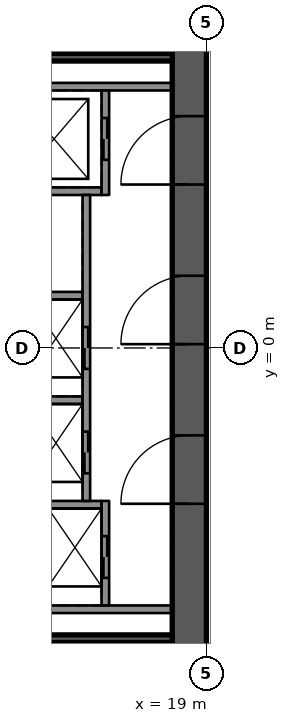
"""IFC4 building model, lengths in metres.
Left out: names, types, materials, properties, quantities, classifications, styles, units other than length and angle.
Written with IfcOpenShell. Run it as: python <this file> out.ifc"""

import sys

from ifc_helpers import new_model, si_unit, direction, frame, frame_2d, origin, place, context, subcontext, project, spatial, rectangle, extrude, element, fill, save


model = new_model("IFC4")
c1 = context("Model", 3, precision=1e-05, world=origin(), true_north=direction((0.0, 1.0)))
c2 = subcontext(c1, "Body", "Model", "MODEL_VIEW")
j1 = project(units=[si_unit("LENGTHUNIT", "METRE"), si_unit("PLANEANGLEUNIT", "RADIAN")], contexts=[c1])
p1 = place(None, origin())
s1 = spatial("IfcSite", under=j1, at=p1, CompositionType="ELEMENT")
p2 = place(p1, origin())
s2 = spatial("IfcBuilding", under=s1, at=p2, CompositionType="ELEMENT")
p3 = place(p2, frame((0.0, 0.0, 76.3)))
s3 = spatial("IfcBuildingStorey", under=s2, at=p3, CompositionType="ELEMENT", Elevation=76.3)
p4 = place(p3, frame((18.55, -12.0, 0.0), z_axis=(0.0, 0.0, 1.0), x_axis=(0.0, 1.0, 0.0)))
e1 = element("IfcWall", 1, at=p4, inside=s3, PredefinedType="SHEAR", context=c2, shape_type="SweptSolid", body=[
    extrude(rectangle(XDim=24.0, YDim=0.9, at=frame_2d((12.0, 0.0))), origin(), (0.0, 0.0, 1.0), 4.4),
])
p5 = place(p4, frame((16.3, 0.0, 0.0)))
e2 = element("IfcOpeningElement", 2, at=p5, cuts=e1, PredefinedType="OPENING", context=c2, shape_type="SweptSolid", body=[
    extrude(rectangle(XDim=1.8, YDim=2.1, at=frame_2d((0.9, 1.05))), frame((0.0, 0.46, 0.0), z_axis=(0.0, -1.0, 0.0), x_axis=(1.0, 0.0, 0.0)), (0.0, 0.0, 1.0), 0.92),
])
p6 = place(p4, frame((12.1, 0.0, 0.0)))
e3 = element("IfcOpeningElement", 3, at=p6, cuts=e1, PredefinedType="OPENING", context=c2, shape_type="SweptSolid", body=[
    extrude(rectangle(XDim=1.8, YDim=2.1, at=frame_2d((0.9, 1.05))), frame((0.0, 0.46, 0.0), z_axis=(0.0, -1.0, 0.0), x_axis=(1.0, 0.0, 0.0)), (0.0, 0.0, 1.0), 0.92),
])
p7 = place(p4, frame((7.9, 0.0, 0.0)))
e4 = element("IfcOpeningElement", 4, at=p7, cuts=e1, PredefinedType="OPENING", context=c2, shape_type="SweptSolid", body=[
    extrude(rectangle(XDim=1.8, YDim=2.1, at=frame_2d((0.9, 1.05))), frame((0.0, 0.46, 0.0), z_axis=(0.0, -1.0, 0.0), x_axis=(1.0, 0.0, 0.0)), (0.0, 0.0, 1.0), 0.92),
])
for number, where, z_axis, x_axis in (
    (5, (11.54, -6.875, 0.0), (0.0, 0.0, 1.0), (1.0, 0.0, 0.0)),
    (6, (11.54, 6.875, 0.0), (0.0, 0.0, 1.0), (1.0, 0.0, 0.0)),
):
    element("IfcWall", number, at=place(p3, frame(where, z_axis=z_axis, x_axis=x_axis)), inside=s3, PredefinedType="SOLIDWALL", context=c2, shape_type="SweptSolid", body=[
        extrude(rectangle(XDim=6.56, YDim=0.2, at=frame_2d((3.28, 0.0))), origin(), (0.0, 0.0, 1.0), 3.99),
    ])
p8 = place(p3, frame((11.54, 4.125, 0.0), z_axis=(0.0, 0.0, 1.0), x_axis=(1.0, 0.0, 0.0)))
e7 = element("IfcWall", 7, at=p8, inside=s3, PredefinedType="SOLIDWALL", context=c2, shape_type="SweptSolid", body=[
    extrude(rectangle(XDim=4.7, YDim=0.2, at=frame_2d((2.35, 0.0))), origin(), (0.0, 0.0, 1.0), 3.99),
])
for number, where, z_axis, x_axis in (
    (8, (11.54, 1.375, 0.0), (0.0, 0.0, 1.0), (1.0, 0.0, 0.0)),
    (9, (11.54, -1.375, 0.0), (0.0, 0.0, 1.0), (1.0, 0.0, 0.0)),
):
    element("IfcWall", number, at=place(p3, frame(where, z_axis=z_axis, x_axis=x_axis)), inside=s3, PredefinedType="SOLIDWALL", context=c2, shape_type="SweptSolid", body=[
        extrude(rectangle(XDim=4.2, YDim=0.2, at=frame_2d((2.1, 0.0))), origin(), (0.0, 0.0, 1.0), 3.99),
    ])
p9 = place(p3, frame((11.54, -4.125, 0.0), z_axis=(0.0, 0.0, 1.0), x_axis=(1.0, 0.0, 0.0)))
e10 = element("IfcWall", 10, at=p9, inside=s3, PredefinedType="SOLIDWALL", context=c2, shape_type="SweptSolid", body=[
    extrude(rectangle(XDim=4.7, YDim=0.2, at=frame_2d((2.35, 0.0))), origin(), (0.0, 0.0, 1.0), 3.99),
])
p10 = place(p3, frame((16.34, 6.775, 0.0), z_axis=(0.0, 0.0, 1.0), x_axis=(0.0, -1.0, 0.0)))
e11 = element("IfcWall", 11, at=p10, inside=s3, PredefinedType="SOLIDWALL", context=c2, shape_type="SweptSolid", body=[
    extrude(rectangle(XDim=2.75, YDim=0.2, at=frame_2d((1.375, 0.0))), origin(), (0.0, 0.0, 1.0), 3.99),
])
p11 = place(p10, frame((0.725, 0.0, 0.0)))
e12 = element("IfcOpeningElement", 12, at=p11, cuts=e11, PredefinedType="OPENING", context=c2, shape_type="SweptSolid", body=[
    extrude(rectangle(XDim=1.1, YDim=2.1, at=frame_2d((0.55, 1.05))), frame((0.0, 0.11, 0.0), z_axis=(0.0, -1.0, 0.0), x_axis=(1.0, 0.0, 0.0)), (0.0, 0.0, 1.0), 0.22),
])
p12 = place(p3, frame((15.84, 4.025, 0.0), z_axis=(0.0, 0.0, 1.0), x_axis=(0.0, -1.0, 0.0)))
e13 = element("IfcWall", 13, at=p12, inside=s3, PredefinedType="SOLIDWALL", context=c2, shape_type="SweptSolid", body=[
    extrude(rectangle(XDim=8.05, YDim=0.2, at=frame_2d((4.025, 0.0))), origin(), (0.0, 0.0, 1.0), 3.99),
])
p13 = place(p12, frame((3.475, 0.0, 0.0)))
e14 = element("IfcOpeningElement", 14, at=p13, cuts=e13, PredefinedType="OPENING", context=c2, shape_type="SweptSolid", body=[
    extrude(rectangle(XDim=1.1, YDim=2.1, at=frame_2d((0.55, 1.05))), frame((0.0, 0.11, 0.0), z_axis=(0.0, -1.0, 0.0), x_axis=(1.0, 0.0, 0.0)), (0.0, 0.0, 1.0), 0.22),
])
p14 = place(p12, frame((6.225, 0.0, 0.0)))
e15 = element("IfcOpeningElement", 15, at=p14, cuts=e13, PredefinedType="OPENING", context=c2, shape_type="SweptSolid", body=[
    extrude(rectangle(XDim=1.1, YDim=2.1, at=frame_2d((0.55, 1.05))), frame((0.0, 0.11, 0.0), z_axis=(0.0, -1.0, 0.0), x_axis=(1.0, 0.0, 0.0)), (0.0, 0.0, 1.0), 0.22),
])
p15 = place(p3, frame((16.34, -4.025, 0.0), z_axis=(0.0, 0.0, 1.0), x_axis=(0.0, -1.0, 0.0)))
e16 = element("IfcWall", 16, at=p15, inside=s3, PredefinedType="SOLIDWALL", context=c2, shape_type="SweptSolid", body=[
    extrude(rectangle(XDim=2.75, YDim=0.2, at=frame_2d((1.375, 0.0))), origin(), (0.0, 0.0, 1.0), 3.99),
])
p16 = place(p15, frame((0.925, 0.0, 0.0)))
e17 = element("IfcOpeningElement", 17, at=p16, cuts=e16, PredefinedType="OPENING", context=c2, shape_type="SweptSolid", body=[
    extrude(rectangle(XDim=1.1, YDim=2.1, at=frame_2d((0.55, 1.05))), frame((0.0, 0.11, 0.0), z_axis=(0.0, -1.0, 0.0), x_axis=(1.0, 0.0, 0.0)), (0.0, 0.0, 1.0), 0.22),
])
for number, where, z_axis, x_axis in (
    (18, (11.54, -7.65, 0.0), (0.0, 0.0, 1.0), (1.0, 0.0, 0.0)),
    (19, (11.54, 7.65, 0.0), (0.0, 0.0, 1.0), (1.0, 0.0, 0.0)),
):
    element("IfcWall", number, at=place(p3, frame(where, z_axis=z_axis, x_axis=x_axis)), inside=s3, PredefinedType="SOLIDWALL", context=c2, shape_type="SweptSolid", body=[
        extrude(rectangle(XDim=6.56, YDim=0.2, at=frame_2d((3.28, 0.0))), origin(), (0.0, 0.0, 1.0), 3.99),
    ])
p17 = place(p11, origin())
e20 = element("IfcDoor", 20, at=p17, inside=s3, OperationType="DOUBLE_DOOR_SLIDING", PredefinedType="DOOR", context=c2, shape_type="SweptSolid", body=[
    extrude(rectangle(XDim=1.1, YDim=2.1, at=frame_2d((0.55, 1.05))), frame((0.0, 0.025, 0.0), z_axis=(0.0, -1.0, 0.0), x_axis=(1.0, 0.0, 0.0)), (0.0, 0.0, 1.0), 0.05),
])
fill(e12, e20)
p18 = place(p13, origin())
e21 = element("IfcDoor", 21, at=p18, inside=s3, OperationType="DOUBLE_DOOR_SLIDING", PredefinedType="DOOR", context=c2, shape_type="SweptSolid", body=[
    extrude(rectangle(XDim=1.1, YDim=2.1, at=frame_2d((0.55, 1.05))), frame((0.0, 0.025, 0.0), z_axis=(0.0, -1.0, 0.0), x_axis=(1.0, 0.0, 0.0)), (0.0, 0.0, 1.0), 0.05),
])
fill(e14, e21)
p19 = place(p14, origin())
e22 = element("IfcDoor", 22, at=p19, inside=s3, OperationType="DOUBLE_DOOR_SLIDING", PredefinedType="DOOR", context=c2, shape_type="SweptSolid", body=[
    extrude(rectangle(XDim=1.1, YDim=2.1, at=frame_2d((0.55, 1.05))), frame((0.0, 0.025, 0.0), z_axis=(0.0, -1.0, 0.0), x_axis=(1.0, 0.0, 0.0)), (0.0, 0.0, 1.0), 0.05),
])
fill(e15, e22)
p20 = place(p16, origin())
e23 = element("IfcDoor", 23, at=p20, inside=s3, OperationType="DOUBLE_DOOR_SLIDING", PredefinedType="DOOR", context=c2, shape_type="SweptSolid", body=[
    extrude(rectangle(XDim=1.1, YDim=2.1, at=frame_2d((0.55, 1.05))), frame((0.0, 0.025, 0.0), z_axis=(0.0, -1.0, 0.0), x_axis=(1.0, 0.0, 0.0)), (0.0, 0.0, 1.0), 0.05),
])
fill(e17, e23)
p21 = place(p5, origin())
e24 = element("IfcDoor", 24, at=p21, inside=s3, OperationType="SINGLE_SWING_RIGHT", PredefinedType="DOOR", context=c2, shape_type="SweptSolid", body=[
    extrude(rectangle(XDim=1.8, YDim=2.1, at=frame_2d((0.9, 1.05))), frame((0.0, 0.025, 0.0), z_axis=(0.0, -1.0, 0.0), x_axis=(1.0, 0.0, 0.0)), (0.0, 0.0, 1.0), 0.05),
])
fill(e2, e24)
p22 = place(p6, origin())
e25 = element("IfcDoor", 25, at=p22, inside=s3, OperationType="SINGLE_SWING_RIGHT", PredefinedType="DOOR", context=c2, shape_type="SweptSolid", body=[
    extrude(rectangle(XDim=1.8, YDim=2.1, at=frame_2d((0.9, 1.05))), frame((0.0, 0.025, 0.0), z_axis=(0.0, -1.0, 0.0), x_axis=(1.0, 0.0, 0.0)), (0.0, 0.0, 1.0), 0.05),
])
fill(e3, e25)
p23 = place(p7, origin())
e26 = element("IfcDoor", 26, at=p23, inside=s3, OperationType="SINGLE_SWING_LEFT", PredefinedType="DOOR", context=c2, shape_type="SweptSolid", body=[
    extrude(rectangle(XDim=1.8, YDim=2.1, at=frame_2d((0.9, 1.05))), frame((0.0, 0.025, 0.0), z_axis=(0.0, -1.0, 0.0), x_axis=(1.0, 0.0, 0.0)), (0.0, 0.0, 1.0), 0.05),
])
fill(e4, e26)
save(model, sys.argv[1])
